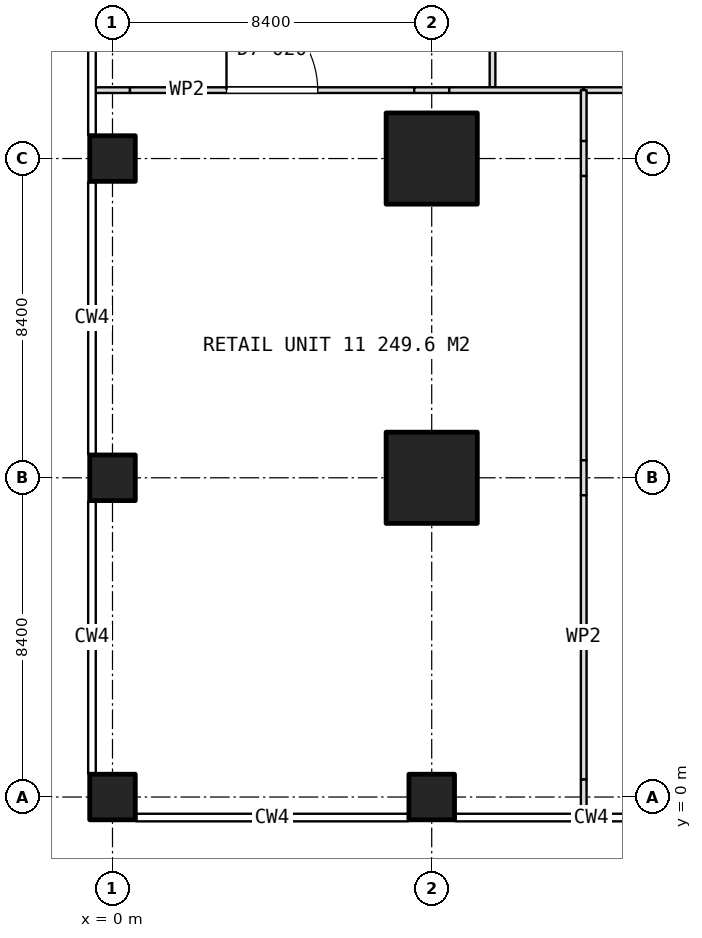
"""IFC4 building model, lengths in metres.
Left out: names, types, materials, properties, quantities, classifications, styles, units other than length and angle.
Written with IfcOpenShell. Run it as: python <this file> out.ifc"""

import sys

from ifc_helpers import new_model, si_unit, direction, frame, frame_2d, origin, origin_2d, place, context, subcontext, project, spatial, rectangle, extrude, element, fill, save


model = new_model("IFC4")
c1 = context("Model", 3, precision=1e-05, world=origin(), true_north=direction((0.0, 1.0)))
c2 = subcontext(c1, "Body", "Model", "MODEL_VIEW")
j1 = project(units=[si_unit("LENGTHUNIT", "METRE"), si_unit("PLANEANGLEUNIT", "RADIAN")], contexts=[c1])
p1 = place(None, origin())
s1 = spatial("IfcSite", under=j1, at=p1, CompositionType="ELEMENT")
p2 = place(p1, origin())
s2 = spatial("IfcBuilding", under=s1, at=p2, CompositionType="ELEMENT")
p3 = place(p2, frame((0.0, 0.0, 10.4)))
s3 = spatial("IfcBuildingStorey", under=s2, at=p3, CompositionType="ELEMENT", Elevation=10.4)
for number, where, z_axis, x_axis in (
    (1, (0.0, 0.0, 0.0), (0.0, 0.0, 1.0), (1.0, 0.0, 0.0)),
    (2, (0.0, 8.4, 0.0), (0.0, 0.0, 1.0), (1.0, 0.0, 0.0)),
    (3, (0.0, 16.8, 0.0), (0.0, 0.0, 1.0), (1.0, 0.0, 0.0)),
    (4, (8.4, 0.0, 0.0), (0.0, 0.0, 1.0), (1.0, 0.0, 0.0)),
):
    element("IfcColumn", number, at=place(p3, frame(where, z_axis=z_axis, x_axis=x_axis)), inside=s3, PredefinedType="COLUMN", context=c2, shape_type="SweptSolid", body=[
        extrude(rectangle(XDim=1.2, YDim=1.2, at=origin_2d()), origin(), (0.0, 0.0, 1.0), 5.0),
    ])
for number, where, z_axis, x_axis in (
    (5, (8.4, 8.4, 0.0), (0.0, 0.0, 1.0), (1.0, 0.0, 0.0)),
    (6, (8.4, 16.8, 0.0), (0.0, 0.0, 1.0), (1.0, 0.0, 0.0)),
):
    element("IfcColumn", number, at=place(p3, frame(where, z_axis=z_axis, x_axis=x_axis)), inside=s3, PredefinedType="COLUMN", context=c2, shape_type="SweptSolid", body=[
        extrude(rectangle(XDim=2.4, YDim=2.4, at=origin_2d()), origin(), (0.0, 0.0, 1.0), 5.0),
    ])
p4 = place(p3, frame((-0.49, 18.6, 0.0), z_axis=(0.0, 0.0, 1.0), x_axis=(1.0, 0.0, 0.0)))
e7 = element("IfcWall", 7, at=p4, inside=s3, PredefinedType="PARTITIONING", context=c2, shape_type="SweptSolid", body=[
    extrude(rectangle(XDim=0.95, YDim=0.15, at=frame_2d((0.475, 0.0))), origin(), (0.0, 0.0, 1.0), 2.9),
])
p5 = place(p3, frame((0.46, 18.6, 0.0), z_axis=(0.0, 0.0, 1.0), x_axis=(1.0, 0.0, 0.0)))
e8 = element("IfcWall", 8, at=p5, inside=s3, PredefinedType="PARTITIONING", context=c2, shape_type="SweptSolid", body=[
    extrude(rectangle(XDim=7.48, YDim=0.15, at=frame_2d((3.74, 0.0))), origin(), (0.0, 0.0, 1.0), 4.7),
])
p6 = place(p5, frame((2.54, 0.0, 0.0)))
e9 = element("IfcOpeningElement", 9, at=p6, cuts=e8, PredefinedType="OPENING", context=c2, shape_type="SweptSolid", body=[
    extrude(rectangle(XDim=2.4, YDim=2.4, at=frame_2d((1.2, 1.2))), frame((0.0, 0.085, 0.0), z_axis=(0.0, -1.0, 0.0), x_axis=(1.0, 0.0, 0.0)), (0.0, 0.0, 1.0), 0.17),
])
p7 = place(p3, frame((7.94, 18.6, 0.0), z_axis=(0.0, 0.0, 1.0), x_axis=(1.0, 0.0, 0.0)))
e10 = element("IfcWall", 10, at=p7, inside=s3, PredefinedType="PARTITIONING", context=c2, shape_type="SweptSolid", body=[
    extrude(rectangle(XDim=0.92, YDim=0.15, at=frame_2d((0.46, 0.0))), origin(), (0.0, 0.0, 1.0), 2.9),
])
p8 = place(p3, frame((8.86, 18.6, 0.0), z_axis=(0.0, 0.0, 1.0), x_axis=(1.0, 0.0, 0.0)))
e11 = element("IfcWall", 11, at=p8, inside=s3, PredefinedType="PARTITIONING", context=c2, shape_type="SweptSolid", body=[
    extrude(rectangle(XDim=3.54, YDim=0.15, at=frame_2d((1.77, 0.0))), origin(), (0.0, 0.0, 1.0), 4.7),
])
p9 = place(p3, frame((12.4, 18.6, 0.0), z_axis=(0.0, 0.0, 1.0), x_axis=(0.0, -1.0, 0.0)))
e12 = element("IfcWall", 12, at=p9, inside=s3, PredefinedType="PARTITIONING", context=c2, shape_type="SweptSolid", body=[
    extrude(rectangle(XDim=1.34, YDim=0.15, at=frame_2d((0.67, 0.0))), origin(), (0.0, 0.0, 1.0), 4.7),
])
p10 = place(p3, frame((12.4, 17.26, 0.0), z_axis=(0.0, 0.0, 1.0), x_axis=(0.0, -1.0, 0.0)))
e13 = element("IfcWall", 13, at=p10, inside=s3, PredefinedType="PARTITIONING", context=c2, shape_type="SweptSolid", body=[
    extrude(rectangle(XDim=0.92, YDim=0.15, at=frame_2d((0.46, 0.0))), origin(), (0.0, 0.0, 1.0), 2.9),
])
p11 = place(p3, frame((12.4, 16.34, 0.0), z_axis=(0.0, 0.0, 1.0), x_axis=(0.0, -1.0, 0.0)))
e14 = element("IfcWall", 14, at=p11, inside=s3, PredefinedType="PARTITIONING", context=c2, shape_type="SweptSolid", body=[
    extrude(rectangle(XDim=7.48, YDim=0.15, at=frame_2d((3.74, 0.0))), origin(), (0.0, 0.0, 1.0), 4.7),
])
p12 = place(p3, frame((12.4, 8.86, 0.0), z_axis=(0.0, 0.0, 1.0), x_axis=(0.0, -1.0, 0.0)))
e15 = element("IfcWall", 15, at=p12, inside=s3, PredefinedType="PARTITIONING", context=c2, shape_type="SweptSolid", body=[
    extrude(rectangle(XDim=0.92, YDim=0.15, at=frame_2d((0.46, 0.0))), origin(), (0.0, 0.0, 1.0), 2.9),
])
p13 = place(p3, frame((12.4, 7.94, 0.0), z_axis=(0.0, 0.0, 1.0), x_axis=(0.0, -1.0, 0.0)))
e16 = element("IfcWall", 16, at=p13, inside=s3, PredefinedType="PARTITIONING", context=c2, shape_type="SweptSolid", body=[
    extrude(rectangle(XDim=7.48, YDim=0.15, at=frame_2d((3.74, 0.0))), origin(), (0.0, 0.0, 1.0), 4.7),
])
p14 = place(p3, frame((12.4, 0.46, 0.0), z_axis=(0.0, 0.0, 1.0), x_axis=(0.0, -1.0, 0.0)))
e17 = element("IfcWall", 17, at=p14, inside=s3, PredefinedType="PARTITIONING", context=c2, shape_type="SweptSolid", body=[
    extrude(rectangle(XDim=0.95, YDim=0.15, at=frame_2d((0.475, 0.0))), origin(), (0.0, 0.0, 1.0), 2.9),
])
p15 = place(p3, frame((16.34, 18.6, 0.0), z_axis=(0.0, 0.0, 1.0), x_axis=(-1.0, 0.0, 0.0)))
e18 = element("IfcWall", 18, at=p15, inside=s3, PredefinedType="PARTITIONING", context=c2, shape_type="SweptSolid", body=[
    extrude(rectangle(XDim=3.94, YDim=0.15, at=frame_2d((1.97, 0.0))), origin(), (0.0, 0.0, 1.0), 4.7),
])
p16 = place(p3, frame((10.0, 18.675, 0.0), z_axis=(0.0, 0.0, 1.0), x_axis=(0.0, 1.0, 0.0)))
e19 = element("IfcWall", 19, at=p16, inside=s3, PredefinedType="PARTITIONING", context=c2, shape_type="SweptSolid", body=[
    extrude(rectangle(XDim=6.065, YDim=0.15, at=frame_2d((3.032, 0.0))), origin(), (0.0, 0.0, 1.0), 4.7),
])
p17 = place(p6, origin())
e20 = element("IfcDoor", 20, at=p17, inside=s3, OperationType="DOUBLE_DOOR_SINGLE_SWING", PredefinedType="DOOR", context=c2, shape_type="SweptSolid", body=[
    extrude(rectangle(XDim=2.4, YDim=2.4, at=frame_2d((1.2, 1.2))), frame((0.0, 0.025, 0.0), z_axis=(0.0, -1.0, 0.0), x_axis=(1.0, 0.0, 0.0)), (0.0, 0.0, 1.0), 0.05),
])
fill(e9, e20)
save(model, sys.argv[1])
